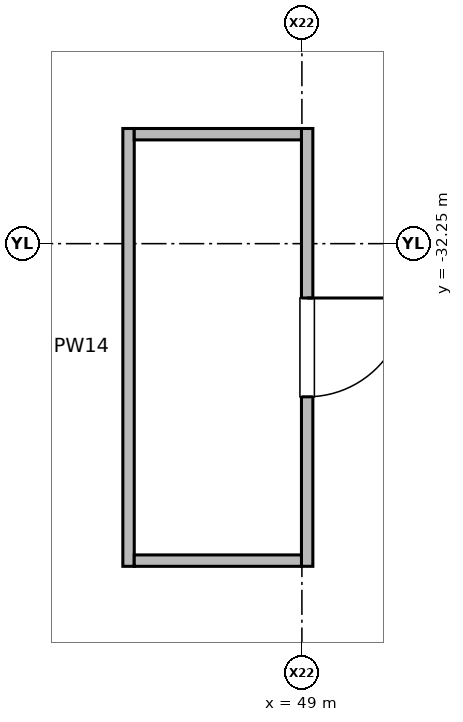
"""IFC4 building model, lengths in metres.
Left out: names, types, materials, properties, quantities, classifications, styles, units other than length and angle.
Written with IfcOpenShell. Run it as: python <this file> out.ifc"""

import sys

from ifc_helpers import new_model, si_unit, direction, frame, frame_2d, origin, place, context, subcontext, project, spatial, rectangle, extrude, element, fill, save


model = new_model("IFC4")
c1 = context("Model", 3, precision=1e-05, world=origin(), true_north=direction((0.0, 1.0)))
c2 = subcontext(c1, "Body", "Model", "MODEL_VIEW")
j1 = project(units=[si_unit("LENGTHUNIT", "METRE"), si_unit("PLANEANGLEUNIT", "RADIAN")], contexts=[c1])
p1 = place(None, origin())
s1 = spatial("IfcSite", under=j1, at=p1, CompositionType="ELEMENT")
p2 = place(p1, origin())
s2 = spatial("IfcBuilding", under=s1, at=p2, CompositionType="ELEMENT")
p3 = place(p2, origin())
s3 = spatial("IfcBuildingStorey", under=s2, at=p3, CompositionType="ELEMENT", Elevation=0.0)
p4 = place(p3, frame((49.069, -30.735, 0.0), z_axis=(0.0, 0.0, 1.0), x_axis=(0.0, -1.0, 0.0)))
e1 = element("IfcWall", 1, at=p4, inside=s3, PredefinedType="PARTITIONING", context=c2, shape_type="SweptSolid", body=[
    extrude(rectangle(XDim=5.76, YDim=0.15, at=frame_2d((2.88, 0.0))), origin(), (0.0, 0.0, 1.0), 5.02),
])
p5 = place(p4, frame((2.23, 0.0, 0.0)))
e2 = element("IfcOpeningElement", 2, at=p5, cuts=e1, PredefinedType="OPENING", context=c2, shape_type="SweptSolid", body=[
    extrude(rectangle(XDim=1.3, YDim=2.3, at=frame_2d((0.65, 1.15))), frame((0.0, 0.085, 0.0), z_axis=(0.0, -1.0, 0.0), x_axis=(1.0, 0.0, 0.0)), (0.0, 0.0, 1.0), 0.17),
])
p6 = place(p3, frame((46.719, -36.495, 0.0), z_axis=(0.0, 0.0, 1.0), x_axis=(0.0, 1.0, 0.0)))
e3 = element("IfcWall", 3, at=p6, inside=s3, PredefinedType="PARTITIONING", context=c2, shape_type="SweptSolid", body=[
    extrude(rectangle(XDim=5.76, YDim=0.15, at=frame_2d((2.88, 0.0))), origin(), (0.0, 0.0, 1.0), 5.02),
])
for number, where, z_axis, x_axis in (
    (4, (46.794, -36.42, 0.0), (0.0, 0.0, 1.0), (1.0, 0.0, 0.0)),
    (5, (46.794, -30.81, 0.0), (0.0, 0.0, 1.0), (1.0, 0.0, 0.0)),
):
    element("IfcWall", number, at=place(p3, frame(where, z_axis=z_axis, x_axis=x_axis)), inside=s3, PredefinedType="PARTITIONING", context=c2, shape_type="SweptSolid", body=[
        extrude(rectangle(XDim=2.2, YDim=0.15, at=frame_2d((1.1, 0.0))), origin(), (0.0, 0.0, 1.0), 5.02),
    ])
p7 = place(p5, origin())
e6 = element("IfcDoor", 6, at=p7, inside=s3, OperationType="SINGLE_SWING_LEFT", PredefinedType="DOOR", context=c2, shape_type="SweptSolid", body=[
    extrude(rectangle(XDim=1.3, YDim=2.3, at=frame_2d((0.65, 1.15))), frame((0.0, 0.025, 0.0), z_axis=(0.0, -1.0, 0.0), x_axis=(1.0, 0.0, 0.0)), (0.0, 0.0, 1.0), 0.05),
])
fill(e2, e6)
save(model, sys.argv[1])
